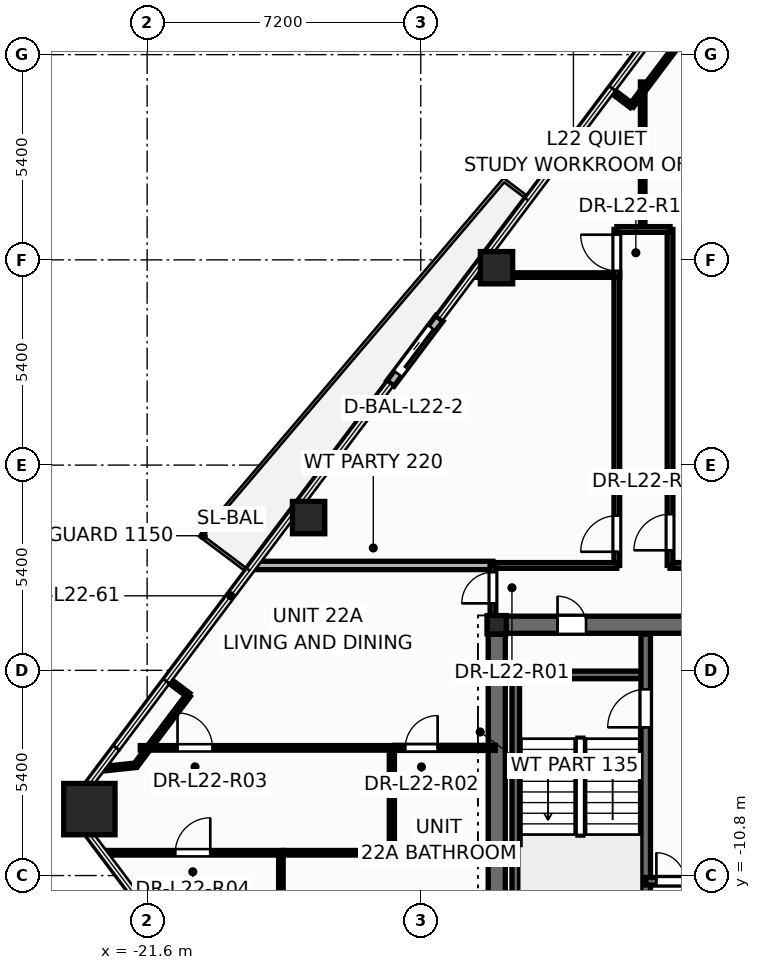
"""IFC4 building model, lengths in metres.
Left out: names, types, materials, properties, quantities, classifications, styles, units other than length and angle.
Written with IfcOpenShell. Run it as: python <this file> out.ifc"""

import sys

from ifc_helpers import new_model, si_unit, direction, frame, frame_2d, origin, origin_2d, place, context, subcontext, project, spatial, rectangle, hollow_rectangle, hollow_circle, i_section, extrude, element, fill, save


model = new_model("IFC4")
c1 = context("Model", 3, precision=1e-05, world=origin(), true_north=direction((0.0, 1.0)))
c2 = subcontext(c1, "Body", "Model", "MODEL_VIEW")
j1 = project(units=[si_unit("LENGTHUNIT", "METRE"), si_unit("PLANEANGLEUNIT", "RADIAN")], contexts=[c1])
p1 = place(None, origin())
s1 = spatial("IfcSite", under=j1, at=p1, CompositionType="ELEMENT")
p2 = place(p1, origin())
s2 = spatial("IfcBuilding", under=s1, at=p2, CompositionType="ELEMENT")
p3 = place(p2, frame((0.0, 0.0, 86.4)))
s3 = spatial("IfcBuildingStorey", under=s2, at=p3, CompositionType="ELEMENT", Elevation=86.4)
p4 = place(p3, frame((-23.119, -9.052, 0.0), z_axis=(0.0, 0.0, 1.0), x_axis=(1.0, 0.0, 0.0)))
e1 = element("IfcColumn", 1, at=p4, inside=s3, PredefinedType="COLUMN", context=c2, shape_type="SweptSolid", body=[
    extrude(hollow_rectangle(XDim=1.35, YDim=1.35, WallThickness=0.065, at=origin_2d()), origin(), (0.0, 0.0, 1.0), 3.6),
])
for number, where, z_axis, x_axis in (
    (2, (-12.406, 5.194, 0.0), (0.0, 0.0, 1.0), (1.0, 0.0, 0.0)),
    (3, (-17.351, -1.381, 0.0), (0.0, 0.0, 1.0), (1.0, 0.0, 0.0)),
):
    element("IfcColumn", number, at=place(p3, frame(where, z_axis=z_axis, x_axis=x_axis)), inside=s3, PredefinedType="COLUMN", context=c2, shape_type="SweptSolid", body=[
        extrude(hollow_circle(Radius=0.425, WallThickness=0.038, at=origin_2d()), origin(), (0.0, 0.0, 1.0), 3.6),
    ])
p5 = place(p3, frame((-12.4, -4.2, 0.0), z_axis=(0.0, 0.0, 1.0), x_axis=(1.0, 0.0, 0.0)))
e4 = element("IfcColumn", 4, at=p5, inside=s3, PredefinedType="COLUMN", context=c2, shape_type="SweptSolid", body=[
    extrude(i_section(OverallWidth=0.5, OverallDepth=0.482, WebThickness=0.04, FlangeThickness=0.045, at=origin_2d()), origin(), (0.0, 0.0, 1.0), 3.6),
])
p6 = place(p3, frame((-13.91, 3.86, -0.015), z_axis=(0.0, 0.0, 1.0), x_axis=(-0.601040017347, -0.799218929673, 0.0)))
e5 = element("IfcWall", 5, at=p6, inside=s3, PredefinedType="STANDARD", context=c2, shape_type="SweptSolid", body=[
    extrude(rectangle(XDim=2.14, YDim=0.24, at=frame_2d((1.07, 0.0))), origin(), (0.0, 0.0, 1.0), 2.658),
])
p7 = place(p6, frame((0.32, 0.0, 0.015)))
e6 = element("IfcOpeningElement", 6, at=p7, cuts=e5, PredefinedType="OPENING", context=c2, shape_type="SweptSolid", body=[
    extrude(rectangle(XDim=1.506, YDim=2.204, at=frame_2d((0.75, 1.102))), frame((0.0, 0.13, 0.0), z_axis=(0.0, -1.0, 0.0), x_axis=(1.0, 0.0, 0.0)), (0.0, 0.0, 1.0), 0.26),
])
p8 = place(p3, frame((-12.65, -4.2, 0.0), z_axis=(0.0, 0.0, 1.0), x_axis=(1.0, 0.0, 0.0)))
e7 = element("IfcWall", 7, at=p8, inside=s3, PredefinedType="SHEAR", context=c2, shape_type="SweptSolid", body=[
    extrude(rectangle(XDim=25.3, YDim=0.45, at=frame_2d((12.65, 0.0))), origin(), (0.0, 0.0, 1.0), 3.6),
])
p9 = place(p8, frame((1.85, 0.0, 0.0)))
e8 = element("IfcOpeningElement", 8, at=p9, cuts=e7, PredefinedType="OPENING", context=c2, shape_type="SweptSolid", body=[
    extrude(rectangle(XDim=0.756, YDim=2.054, at=frame_2d((0.375, 1.027))), frame((0.0, 0.235, 0.0), z_axis=(0.0, -1.0, 0.0), x_axis=(1.0, 0.0, 0.0)), (0.0, 0.0, 1.0), 0.47),
])
p10 = place(p8, frame((21.85, 0.0, 0.0)))
e9 = element("IfcOpeningElement", 9, at=p10, cuts=e7, PredefinedType="OPENING", context=c2, shape_type="SweptSolid", body=[
    extrude(rectangle(XDim=0.756, YDim=2.054, at=frame_2d((0.375, 1.027))), frame((0.0, 0.235, 0.0), z_axis=(0.0, -1.0, 0.0), x_axis=(1.0, 0.0, 0.0)), (0.0, 0.0, 1.0), 0.47),
])
p11 = place(p8, frame((23.5, 0.0, 0.0)))
e10 = element("IfcOpeningElement", 10, at=p11, cuts=e7, PredefinedType="OPENING", context=c2, shape_type="SweptSolid", body=[
    extrude(rectangle(XDim=0.756, YDim=2.054, at=frame_2d((0.375, 1.027))), frame((0.0, 0.235, 0.0), z_axis=(0.0, -1.0, 0.0), x_axis=(1.0, 0.0, 0.0)), (0.0, 0.0, 1.0), 0.47),
])
p12 = place(p8, frame((5.85, 0.0, 0.0)))
e11 = element("IfcOpeningElement", 11, at=p12, cuts=e7, PredefinedType="OPENING", context=c2, shape_type="SweptSolid", body=[
    extrude(rectangle(XDim=1.006, YDim=2.104, at=frame_2d((0.5, 1.052))), frame((0.0, 0.235, 0.0), z_axis=(0.0, -1.0, 0.0), x_axis=(1.0, 0.0, 0.0)), (0.0, 0.0, 1.0), 0.47),
])
p13 = place(p8, frame((10.35, 0.0, 0.0)))
e12 = element("IfcOpeningElement", 12, at=p13, cuts=e7, PredefinedType="OPENING", context=c2, shape_type="SweptSolid", body=[
    extrude(rectangle(XDim=1.406, YDim=2.154, at=frame_2d((0.7, 1.077))), frame((0.0, 0.235, 0.0), z_axis=(0.0, -1.0, 0.0), x_axis=(1.0, 0.0, 0.0)), (0.0, 0.0, 1.0), 0.47),
])
p14 = place(p8, frame((18.45, 0.0, 0.0)))
e13 = element("IfcOpeningElement", 13, at=p14, cuts=e7, PredefinedType="OPENING", context=c2, shape_type="SweptSolid", body=[
    extrude(rectangle(XDim=1.006, YDim=2.104, at=frame_2d((0.5, 1.052))), frame((0.0, 0.235, 0.0), z_axis=(0.0, -1.0, 0.0), x_axis=(1.0, 0.0, 0.0)), (0.0, 0.0, 1.0), 0.47),
])
p15 = place(p3, frame((-12.35, -5.52, 0.0), z_axis=(0.0, 0.0, 1.0), x_axis=(1.0, 0.0, 0.0)))
e14 = element("IfcWall", 14, at=p15, inside=s3, PredefinedType="SOLIDWALL", context=c2, shape_type="SweptSolid", body=[
    extrude(rectangle(XDim=3.87, YDim=0.2, at=frame_2d((1.935, 0.0))), origin(), (0.0, 0.0, 1.0), 3.6),
])
p16 = place(p3, frame((-11.9, -13.1, 0.0), z_axis=(0.0, 0.0, 1.0), x_axis=(0.0, 1.0, 0.0)))
e15 = element("IfcWall", 15, at=p16, inside=s3, PredefinedType="SOLIDWALL", context=c2, shape_type="SweptSolid", body=[
    extrude(rectangle(XDim=7.58, YDim=0.2, at=frame_2d((3.79, 0.0))), origin(), (0.0, 0.0, 1.0), 3.6),
])
p17 = place(p3, frame((-8.48, -13.85, 0.0), z_axis=(0.0, 0.0, 1.0), x_axis=(0.0, 1.0, 0.0)))
e16 = element("IfcWall", 16, at=p17, inside=s3, PredefinedType="SHEAR", context=c2, shape_type="SweptSolid", body=[
    extrude(rectangle(XDim=9.4, YDim=0.25, at=frame_2d((4.7, 0.0))), origin(), (0.0, 0.0, 1.0), 3.6),
])
p18 = place(p17, frame((6.95, 0.0, 0.0)))
e17 = element("IfcOpeningElement", 17, at=p18, cuts=e16, PredefinedType="OPENING", context=c2, shape_type="SweptSolid", body=[
    extrude(rectangle(XDim=1.006, YDim=2.104, at=frame_2d((0.5, 1.052))), frame((0.0, 0.135, 0.0), z_axis=(0.0, -1.0, 0.0), x_axis=(1.0, 0.0, 0.0)), (0.0, 0.0, 1.0), 0.27),
])
p19 = place(p3, frame((-8.48, -10.95, 0.0), z_axis=(0.0, 0.0, 1.0), x_axis=(1.0, 0.0, 0.0)))
e18 = element("IfcWall", 18, at=p19, inside=s3, PredefinedType="SOLIDWALL", context=c2, shape_type="SweptSolid", body=[
    extrude(rectangle(XDim=3.36, YDim=0.2, at=frame_2d((1.68, 0.0))), origin(), (0.0, 0.0, 1.0), 3.6),
])
p20 = place(p19, frame((0.28, 0.0, 0.0)))
e19 = element("IfcOpeningElement", 19, at=p20, cuts=e18, PredefinedType="OPENING", context=c2, shape_type="SweptSolid", body=[
    extrude(rectangle(XDim=0.756, YDim=2.054, at=frame_2d((0.375, 1.027))), frame((0.0, 0.11, 0.0), z_axis=(0.0, -1.0, 0.0), x_axis=(1.0, 0.0, 0.0)), (0.0, 0.0, 1.0), 0.22),
])
p21 = place(p19, frame((1.85, 0.0, 0.0)))
e20 = element("IfcOpeningElement", 20, at=p21, cuts=e18, PredefinedType="OPENING", context=c2, shape_type="SweptSolid", body=[
    extrude(rectangle(XDim=1.106, YDim=2.104, at=frame_2d((0.55, 1.052))), frame((0.0, 0.11, 0.0), z_axis=(0.0, -1.0, 0.0), x_axis=(1.0, 0.0, 0.0)), (0.0, 0.0, 1.0), 0.22),
])
p22 = place(p3, frame((-12.4, -13.85, 0.0), z_axis=(0.0, 0.0, 1.0), x_axis=(0.0, 1.0, 0.0)))
e21 = element("IfcWall", 21, at=p22, inside=s3, PredefinedType="SHEAR", context=c2, shape_type="SweptSolid", body=[
    extrude(rectangle(XDim=9.4, YDim=0.45, at=frame_2d((4.7, 0.0))), origin(), (0.0, 0.0, 1.0), 3.6),
])
p23 = place(p3, frame((-7.84, -2.64, 0.0), z_axis=(0.0, 0.0, 1.0), x_axis=(1.0, 0.0, 0.0)))
e22 = element("IfcWall", 22, at=p23, inside=s3, PredefinedType="PARTITIONING", context=c2, shape_type="SweptSolid", body=[
    extrude(rectangle(XDim=15.68, YDim=0.15, at=frame_2d((7.84, 0.0))), origin(), (0.0, 0.0, 1.0), 2.255),
])
p24 = place(p3, frame((-7.84, -2.64, 0.0), z_axis=(0.0, 0.0, 1.0), x_axis=(0.0, 1.0, 0.0)))
e23 = element("IfcWall", 23, at=p24, inside=s3, PredefinedType="PARTITIONING", context=c2, shape_type="SweptSolid", body=[
    extrude(rectangle(XDim=8.84, YDim=0.15, at=frame_2d((4.42, 0.0))), origin(), (0.0, 0.0, 1.0), 2.439),
])
p25 = place(p24, frame((0.399, 0.0, 0.0)))
e24 = element("IfcOpeningElement", 24, at=p25, cuts=e23, PredefinedType="OPENING", context=c2, shape_type="SweptSolid", body=[
    extrude(rectangle(XDim=0.956, YDim=2.104, at=frame_2d((0.475, 1.052))), frame((0.0, 0.085, 0.0), z_axis=(0.0, -1.0, 0.0), x_axis=(1.0, 0.0, 0.0)), (0.0, 0.0, 1.0), 0.17),
])
p26 = place(p3, frame((-9.24, -2.64, 0.0), z_axis=(0.0, 0.0, 1.0), x_axis=(0.0, 1.0, 0.0)))
e25 = element("IfcWall", 25, at=p26, inside=s3, PredefinedType="PARTITIONING", context=c2, shape_type="SweptSolid", body=[
    extrude(rectangle(XDim=7.7, YDim=0.15, at=frame_2d((3.85, 0.0))), origin(), (0.0, 0.0, 1.0), 2.439),
])
p27 = place(p26, frame((0.36, 0.0, 0.0)))
e26 = element("IfcOpeningElement", 26, at=p27, cuts=e25, PredefinedType="OPENING", context=c2, shape_type="SweptSolid", body=[
    extrude(rectangle(XDim=0.956, YDim=2.104, at=frame_2d((0.475, 1.052))), frame((0.0, 0.085, 0.0), z_axis=(0.0, -1.0, 0.0), x_axis=(1.0, 0.0, 0.0)), (0.0, 0.0, 1.0), 0.17),
])
p28 = place(p3, frame((-21.78, -7.44, 0.0), z_axis=(0.0, 0.0, 1.0), x_axis=(1.0, 0.0, 0.0)))
e27 = element("IfcWall", 27, at=p28, inside=s3, PredefinedType="PARTITIONING", context=c2, shape_type="SweptSolid", body=[
    extrude(rectangle(XDim=6.7, YDim=0.12, at=frame_2d((3.35, 0.0))), origin(), (0.0, 0.0, 1.0), 2.255),
])
p29 = place(p28, frame((0.98, 0.0, 0.0)))
e28 = element("IfcOpeningElement", 28, at=p29, cuts=e27, PredefinedType="OPENING", context=c2, shape_type="SweptSolid", body=[
    extrude(rectangle(XDim=0.926, YDim=2.104, at=frame_2d((0.46, 1.052))), frame((0.0, 0.07, 0.0), z_axis=(0.0, -1.0, 0.0), x_axis=(1.0, 0.0, 0.0)), (0.0, 0.0, 1.0), 0.14),
])
p30 = place(p3, frame((-18.798, -2.64, 0.0), z_axis=(0.0, 0.0, 1.0), x_axis=(1.0, 0.0, 0.0)))
e29 = element("IfcWall", 29, at=p30, inside=s3, PredefinedType="PARTITIONING", context=c2, shape_type="SweptSolid", body=[
    extrude(rectangle(XDim=6.298, YDim=0.22, at=frame_2d((3.149, 0.0))), origin(), (0.0, 0.0, 1.0), 2.644),
])
p31 = place(p3, frame((-18.08, -16.418, 0.0), z_axis=(0.0, 0.0, 1.0), x_axis=(0.0, 1.0, 0.0)))
e30 = element("IfcWall", 30, at=p31, inside=s3, PredefinedType="PARTITIONING", context=c2, shape_type="SweptSolid", body=[
    extrude(rectangle(XDim=6.218, YDim=0.12, at=frame_2d((3.109, 0.0))), origin(), (0.0, 0.0, 1.0), 2.644),
])
p32 = place(p31, frame((2.596, 0.0, 0.0)))
e31 = element("IfcOpeningElement", 31, at=p32, cuts=e30, PredefinedType="OPENING", context=c2, shape_type="SweptSolid", body=[
    extrude(rectangle(XDim=0.926, YDim=2.104, at=frame_2d((0.46, 1.052))), frame((0.0, 0.07, 0.0), z_axis=(0.0, -1.0, 0.0), x_axis=(1.0, 0.0, 0.0)), (0.0, 0.0, 1.0), 0.14),
])
p33 = place(p3, frame((-22.756, -10.2, 0.0), z_axis=(0.0, 0.0, 1.0), x_axis=(1.0, 0.0, 0.0)))
e32 = element("IfcWall", 32, at=p33, inside=s3, PredefinedType="PARTITIONING", context=c2, shape_type="SweptSolid", body=[
    extrude(rectangle(XDim=4.736, YDim=0.12, at=frame_2d((2.368, 0.0))), origin(), (0.0, 0.0, 1.0), 2.644),
])
p34 = place(p33, frame((1.898, 0.0, 0.0)))
e33 = element("IfcOpeningElement", 33, at=p34, cuts=e32, PredefinedType="OPENING", context=c2, shape_type="SweptSolid", body=[
    extrude(rectangle(XDim=0.926, YDim=2.104, at=frame_2d((0.46, 1.052))), frame((0.0, 0.07, 0.0), z_axis=(0.0, -1.0, 0.0), x_axis=(1.0, 0.0, 0.0)), (0.0, 0.0, 1.0), 0.14),
])
p35 = place(p3, frame((-8.56, 6.2, 0.0), z_axis=(0.0, 0.0, 1.0), x_axis=(0.0, 1.0, 0.0)))
e34 = element("IfcWall", 34, at=p35, inside=s3, PredefinedType="PARTITIONING", context=c2, shape_type="SweptSolid", body=[
    extrude(rectangle(XDim=3.88, YDim=0.12, at=frame_2d((1.94, 0.0))), origin(), (0.0, 0.0, 1.0), 2.439),
])
p36 = place(p3, frame((-13.052, 5.0, 0.0), z_axis=(0.0, 0.0, 1.0), x_axis=(1.0, 0.0, 0.0)))
e35 = element("IfcWall", 35, at=p36, inside=s3, PredefinedType="PARTITIONING", context=c2, shape_type="SweptSolid", body=[
    extrude(rectangle(XDim=3.812, YDim=0.12, at=frame_2d((1.906, 0.0))), origin(), (0.0, 0.0, 1.0), 2.439),
])
p37 = place(p3, frame((-12.5, -2.64, 0.0), z_axis=(0.0, 0.0, 1.0), x_axis=(1.0, 0.0, 0.0)))
e36 = element("IfcWall", 36, at=p37, inside=s3, PredefinedType="PARTITIONING", context=c2, shape_type="SweptSolid", body=[
    extrude(rectangle(XDim=3.26, YDim=0.15, at=frame_2d((1.63, 0.0))), origin(), (0.0, 0.0, 1.0), 3.28),
])
p38 = place(p3, frame((-18.018, -10.2, 0.0), z_axis=(0.0, 0.0, 1.0), x_axis=(1.0, 0.0, 0.0)))
e37 = element("IfcWall", 37, at=p38, inside=s3, PredefinedType="PARTITIONING", context=c2, shape_type="SweptSolid", body=[
    extrude(rectangle(XDim=2.858, YDim=0.12, at=frame_2d((1.429, 0.0))), origin(), (0.0, 0.0, 1.0), 3.28),
])
p39 = place(p3, frame((-15.078, -7.44, 0.0), z_axis=(0.0, 0.0, 1.0), x_axis=(1.0, 0.0, 0.0)))
e38 = element("IfcWall", 38, at=p39, inside=s3, PredefinedType="PARTITIONING", context=c2, shape_type="SweptSolid", body=[
    extrude(rectangle(XDim=2.638, YDim=0.135, at=frame_2d((1.319, 0.0))), origin(), (0.0, 0.0, 1.0), 2.644),
])
p40 = place(p39, frame((0.272, 0.0, 0.0)))
e39 = element("IfcOpeningElement", 39, at=p40, cuts=e38, PredefinedType="OPENING", context=c2, shape_type="SweptSolid", body=[
    extrude(rectangle(XDim=0.856, YDim=2.104, at=frame_2d((0.425, 1.052))), frame((0.0, 0.078, 0.0), z_axis=(0.0, -1.0, 0.0), x_axis=(1.0, 0.0, 0.0)), (0.0, 0.0, 1.0), 0.155),
])
p41 = place(p3, frame((-15.16, -10.2, 0.0), z_axis=(0.0, 0.0, 1.0), x_axis=(0.0, 1.0, 0.0)))
e40 = element("IfcWall", 40, at=p41, inside=s3, PredefinedType="PARTITIONING", context=c2, shape_type="SweptSolid", body=[
    extrude(rectangle(XDim=2.76, YDim=0.135, at=frame_2d((1.38, 0.0))), origin(), (0.0, 0.0, 1.0), 3.28),
])
p42 = place(p3, frame((-15.16, -10.2, 0.0), z_axis=(0.0, 0.0, 1.0), x_axis=(1.0, 0.0, 0.0)))
e41 = element("IfcWall", 41, at=p42, inside=s3, PredefinedType="PARTITIONING", context=c2, shape_type="SweptSolid", body=[
    extrude(rectangle(XDim=2.72, YDim=0.135, at=frame_2d((1.36, 0.0))), origin(), (0.0, 0.0, 1.0), 2.644),
])
p43 = place(p3, frame((-20.512, -6.051, 0.0), z_axis=(0.0, 0.0, 1.0), x_axis=(-0.601114822283, -0.799162668317, 0.0)))
e42 = element("IfcWall", 42, at=p43, inside=s3, PredefinedType="PARTITIONING", context=c2, shape_type="SweptSolid", body=[
    extrude(rectangle(XDim=2.311, YDim=0.12, at=frame_2d((1.156, 0.0))), origin(), (0.0, 0.0, 1.0), 3.28),
])
p44 = place(p3, frame((-7.462, 11.302, 0.0), z_axis=(0.0, 0.0, 1.0), x_axis=(-0.600996618, -0.799251565624, 0.0)))
e43 = element("IfcWall", 43, at=p44, inside=s3, PredefinedType="PARTITIONING", context=c2, shape_type="SweptSolid", body=[
    extrude(rectangle(XDim=2.312, YDim=0.12, at=frame_2d((1.156, 0.0))), origin(), (0.0, 0.0, 1.0), 3.28),
])
p45 = place(p3, frame((-12.5, -4.24, 0.0), z_axis=(0.0, 0.0, 1.0), x_axis=(0.0, 1.0, 0.0)))
e44 = element("IfcWall", 44, at=p45, inside=s3, PredefinedType="PARTITIONING", context=c2, shape_type="SweptSolid", body=[
    extrude(rectangle(XDim=1.6, YDim=0.15, at=frame_2d((0.8, 0.0))), origin(), (0.0, 0.0, 1.0), 2.255),
])
p46 = place(p45, frame((0.602, 0.0, 0.0)))
e45 = element("IfcOpeningElement", 45, at=p46, cuts=e44, PredefinedType="OPENING", context=c2, shape_type="SweptSolid", body=[
    extrude(rectangle(XDim=0.826, YDim=2.104, at=frame_2d((0.41, 1.052))), frame((0.0, 0.085, 0.0), z_axis=(0.0, -1.0, 0.0), x_axis=(1.0, 0.0, 0.0)), (0.0, 0.0, 1.0), 0.17),
])
p47 = place(p3, frame((-9.24, 4.94, 0.0), z_axis=(0.0, 0.0, 1.0), x_axis=(0.0, 1.0, 0.0)))
e46 = element("IfcWall", 46, at=p47, inside=s3, PredefinedType="PARTITIONING", context=c2, shape_type="SweptSolid", body=[
    extrude(rectangle(XDim=1.26, YDim=0.15, at=frame_2d((0.63, 0.0))), origin(), (0.0, 0.0, 1.0), 3.28),
])
p48 = place(p47, frame((0.173, 0.0, 0.0)))
e47 = element("IfcOpeningElement", 47, at=p48, cuts=e46, PredefinedType="OPENING", context=c2, shape_type="SweptSolid", body=[
    extrude(rectangle(XDim=0.956, YDim=2.104, at=frame_2d((0.475, 1.052))), frame((0.0, 0.085, 0.0), z_axis=(0.0, -1.0, 0.0), x_axis=(1.0, 0.0, 0.0)), (0.0, 0.0, 1.0), 0.17),
])
p49 = place(p3, frame((-21.902, -7.898, 0.0), z_axis=(0.0, 0.0, 1.0), x_axis=(-0.99437860496, -0.10588290701, 0.0)))
e48 = element("IfcWall", 48, at=p49, inside=s3, PredefinedType="PARTITIONING", context=c2, shape_type="SweptSolid", body=[
    extrude(rectangle(XDim=0.849, YDim=0.12, at=frame_2d((0.424, 0.0))), origin(), (0.0, 0.0, 1.0), 2.644),
])
p50 = place(p3, frame((-9.24, 6.2, 0.0), z_axis=(0.0, 0.0, 1.0), x_axis=(1.0, 0.0, 0.0)))
e49 = element("IfcWall", 49, at=p50, inside=s3, PredefinedType="PARTITIONING", context=c2, shape_type="SweptSolid", body=[
    extrude(rectangle(XDim=1.4, YDim=0.15, at=frame_2d((0.7, 0.0))), origin(), (0.0, 0.0, 1.0), 3.28),
])
for number, where, z_axis, x_axis in (
    (50, (-21.048, -5.648, 0.0), (0.0, 0.0, 1.0), (0.799, -0.601, 0.0)),
    (51, (-8.851, 9.455, 0.0), (0.0, 0.0, 1.0), (-0.799, 0.601, 0.0)),
):
    element("IfcWall", number, at=place(p3, frame(where, z_axis=z_axis, x_axis=x_axis)), inside=s3, PredefinedType="PARTITIONING", context=c2, shape_type="SweptSolid", body=[
        extrude(rectangle(XDim=0.67, YDim=0.12, at=frame_2d((0.335, 0.0))), origin(), (0.0, 0.0, 1.0), 2.644),
    ])
p51 = place(p7, origin())
e52 = element("IfcDoor", 52, at=p51, inside=s3, OperationType="SLIDING_TO_RIGHT", PredefinedType="DOOR", context=c2, shape_type="SweptSolid", body=[
    extrude(rectangle(XDim=1.5, YDim=2.2, at=frame_2d((0.75, 1.1))), frame((0.0, 0.025, 0.0), z_axis=(0.0, -1.0, 0.0), x_axis=(1.0, 0.0, 0.0)), (0.0, 0.0, 1.0), 0.05),
])
fill(e6, e52)
p52 = place(p18, origin())
e53 = element("IfcDoor", 53, at=p52, inside=s3, OperationType="SINGLE_SWING_LEFT", PredefinedType="DOOR", context=c2, shape_type="SweptSolid", body=[
    extrude(rectangle(XDim=1.0, YDim=2.1, at=frame_2d((0.5, 1.05))), frame((0.0, 0.025, 0.0), z_axis=(0.0, -1.0, 0.0), x_axis=(1.0, 0.0, 0.0)), (0.0, 0.0, 1.0), 0.05),
])
fill(e17, e53)
p53 = place(p20, origin())
e54 = element("IfcDoor", 54, at=p53, inside=s3, OperationType="SINGLE_SWING_LEFT", PredefinedType="DOOR", context=c2, shape_type="SweptSolid", body=[
    extrude(rectangle(XDim=0.75, YDim=2.05, at=frame_2d((0.375, 1.025))), frame((0.0, 0.025, 0.0), z_axis=(0.0, -1.0, 0.0), x_axis=(1.0, 0.0, 0.0)), (0.0, 0.0, 1.0), 0.05),
])
fill(e19, e54)
p54 = place(p9, origin())
e55 = element("IfcDoor", 55, at=p54, inside=s3, OperationType="SINGLE_SWING_LEFT", PredefinedType="DOOR", context=c2, shape_type="SweptSolid", body=[
    extrude(rectangle(XDim=0.75, YDim=2.05, at=frame_2d((0.375, 1.025))), frame((0.0, 0.025, 0.0), z_axis=(0.0, -1.0, 0.0), x_axis=(1.0, 0.0, 0.0)), (0.0, 0.0, 1.0), 0.05),
])
fill(e8, e55)
p55 = place(p46, origin())
e56 = element("IfcDoor", 56, at=p55, inside=s3, OperationType="SINGLE_SWING_LEFT", PredefinedType="DOOR", context=c2, shape_type="SweptSolid", body=[
    extrude(rectangle(XDim=0.82, YDim=2.1, at=frame_2d((0.41, 1.05))), frame((0.0, 0.025, 0.0), z_axis=(0.0, -1.0, 0.0), x_axis=(1.0, 0.0, 0.0)), (0.0, 0.0, 1.0), 0.05),
])
fill(e45, e56)
p56 = place(p40, origin())
e57 = element("IfcDoor", 57, at=p56, inside=s3, OperationType="SINGLE_SWING_RIGHT", PredefinedType="DOOR", context=c2, shape_type="SweptSolid", body=[
    extrude(rectangle(XDim=0.85, YDim=2.1, at=frame_2d((0.425, 1.05))), frame((0.0, 0.025, 0.0), z_axis=(0.0, -1.0, 0.0), x_axis=(1.0, 0.0, 0.0)), (0.0, 0.0, 1.0), 0.05),
])
fill(e39, e57)
p57 = place(p29, origin())
e58 = element("IfcDoor", 58, at=p57, inside=s3, OperationType="SINGLE_SWING_LEFT", PredefinedType="DOOR", context=c2, shape_type="SweptSolid", body=[
    extrude(rectangle(XDim=0.92, YDim=2.1, at=frame_2d((0.46, 1.05))), frame((0.0, 0.025, 0.0), z_axis=(0.0, -1.0, 0.0), x_axis=(1.0, 0.0, 0.0)), (0.0, 0.0, 1.0), 0.05),
])
fill(e28, e58)
p58 = place(p34, origin())
e59 = element("IfcDoor", 59, at=p58, inside=s3, OperationType="SINGLE_SWING_RIGHT", PredefinedType="DOOR", context=c2, shape_type="SweptSolid", body=[
    extrude(rectangle(XDim=0.92, YDim=2.1, at=frame_2d((0.46, 1.05))), frame((0.0, 0.025, 0.0), z_axis=(0.0, -1.0, 0.0), x_axis=(1.0, 0.0, 0.0)), (0.0, 0.0, 1.0), 0.05),
])
fill(e33, e59)
p59 = place(p27, origin())
e60 = element("IfcDoor", 60, at=p59, inside=s3, OperationType="SINGLE_SWING_LEFT", PredefinedType="DOOR", context=c2, shape_type="SweptSolid", body=[
    extrude(rectangle(XDim=0.95, YDim=2.1, at=frame_2d((0.475, 1.05))), frame((0.0, 0.025, 0.0), z_axis=(0.0, -1.0, 0.0), x_axis=(1.0, 0.0, 0.0)), (0.0, 0.0, 1.0), 0.05),
])
fill(e26, e60)
p60 = place(p48, origin())
e61 = element("IfcDoor", 61, at=p60, inside=s3, OperationType="SINGLE_SWING_RIGHT", PredefinedType="DOOR", context=c2, shape_type="SweptSolid", body=[
    extrude(rectangle(XDim=0.95, YDim=2.1, at=frame_2d((0.475, 1.05))), frame((0.0, 0.025, 0.0), z_axis=(0.0, -1.0, 0.0), x_axis=(1.0, 0.0, 0.0)), (0.0, 0.0, 1.0), 0.05),
])
fill(e47, e61)
p61 = place(p25, origin())
e62 = element("IfcDoor", 62, at=p61, inside=s3, OperationType="SINGLE_SWING_LEFT", PredefinedType="DOOR", context=c2, shape_type="SweptSolid", body=[
    extrude(rectangle(XDim=0.95, YDim=2.1, at=frame_2d((0.475, 1.05))), frame((0.0, 0.025, 0.0), z_axis=(0.0, -1.0, 0.0), x_axis=(1.0, 0.0, 0.0)), (0.0, 0.0, 1.0), 0.05),
])
fill(e24, e62)
save(model, sys.argv[1])
